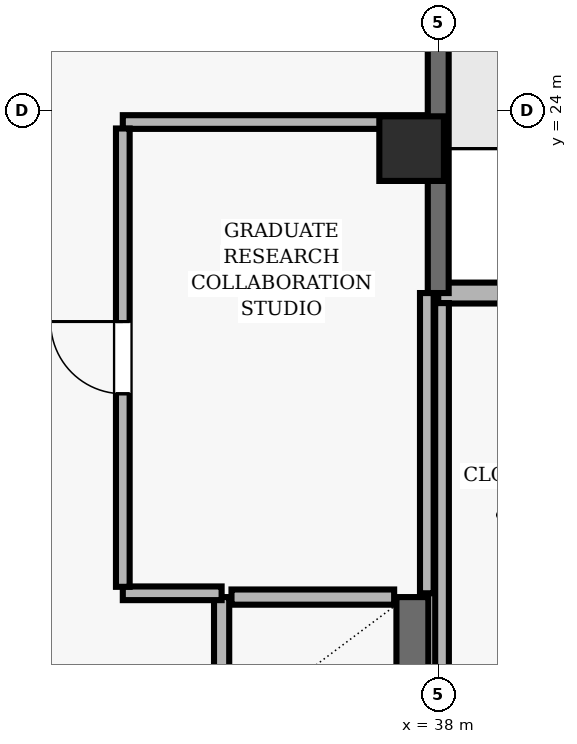
"""IFC4 building model, lengths in metres.
Left out: names, types, materials, properties, quantities, classifications, styles, units other than length and angle.
Written with IfcOpenShell. Run it as: python <this file> out.ifc"""

import sys

from ifc_helpers import new_model, si_unit, direction, frame, frame_2d, origin, origin_2d, place, context, subcontext, project, spatial, rectangle, extrude, element, fill, save


model = new_model("IFC4")
c1 = context("Model", 3, precision=1e-05, world=origin(), true_north=direction((0.0, 1.0)))
c2 = subcontext(c1, "Body", "Model", "MODEL_VIEW")
j1 = project(units=[si_unit("LENGTHUNIT", "METRE"), si_unit("PLANEANGLEUNIT", "RADIAN")], contexts=[c1])
p1 = place(None, origin())
s1 = spatial("IfcSite", under=j1, at=p1, CompositionType="ELEMENT")
p2 = place(p1, origin())
s2 = spatial("IfcBuilding", under=s1, at=p2, CompositionType="ELEMENT")
p3 = place(p2, frame((0.0, 0.0, 279.4)))
s3 = spatial("IfcBuildingStorey", under=s2, at=p3, CompositionType="ELEMENT", Elevation=279.4)
p4 = place(p3, frame((37.65, 23.5, 0.0), z_axis=(0.0, 0.0, 1.0), x_axis=(1.0, 0.0, 0.0)))
e1 = element("IfcColumn", 1, at=p4, inside=s3, PredefinedType="COLUMN", context=c2, shape_type="SweptSolid", body=[
    extrude(rectangle(XDim=0.85, YDim=0.85, at=origin_2d()), origin(), (0.0, 0.0, 1.0), 3.9),
])
p5 = place(p3, frame((43.0, 21.6, 0.0), z_axis=(0.0, 0.0, 1.0), x_axis=(-1.0, 0.0, 0.0)))
e2 = element("IfcWall", 2, at=p5, inside=s3, PredefinedType="SOLIDWALL", context=c2, shape_type="SweptSolid", body=[
    extrude(rectangle(XDim=5.0, YDim=0.275, at=frame_2d((2.5, 0.0))), origin(), (0.0, 0.0, 1.0), 3.69),
])
p6 = place(p3, frame((38.0, 21.6, 0.0), z_axis=(0.0, 0.0, 1.0), x_axis=(0.0, 1.0, 0.0)))
e3 = element("IfcWall", 3, at=p6, inside=s3, PredefinedType="SOLIDWALL", context=c2, shape_type="SweptSolid", body=[
    extrude(rectangle(XDim=13.7, YDim=0.275, at=frame_2d((6.85, 0.0))), origin(), (0.0, 0.0, 1.0), 3.69),
])
p7 = place(p6, frame((5.85, 0.0, 0.0)))
e4 = element("IfcOpeningElement", 4, at=p7, cuts=e3, PredefinedType="OPENING", context=c2, shape_type="SweptSolid", body=[
    extrude(rectangle(XDim=1.0, YDim=2.2, at=frame_2d((0.5, 1.1))), frame((0.0, 0.147, 0.0), z_axis=(0.0, -1.0, 0.0), x_axis=(1.0, 0.0, 0.0)), (0.0, 0.0, 1.0), 0.295),
])
p8 = place(p6, frame((9.075, 0.0, 0.9)))
e5 = element("IfcOpeningElement", 5, at=p8, cuts=e3, PredefinedType="OPENING", context=c2, shape_type="SweptSolid", body=[
    extrude(rectangle(XDim=2.4, YDim=1.6, at=frame_2d((1.2, 0.8))), frame((0.0, 0.147, 0.0), z_axis=(0.0, -1.0, 0.0), x_axis=(1.0, 0.0, 0.0)), (0.0, 0.0, 1.0), 0.295),
])
p9 = place(p3, frame((35.15, 17.6, 0.0), z_axis=(0.0, 0.0, 1.0), x_axis=(0.0, -1.0, 0.0)))
e6 = element("IfcWall", 6, at=p9, inside=s3, PredefinedType="SOLIDWALL", context=c2, shape_type="SweptSolid", body=[
    extrude(rectangle(XDim=1.85, YDim=0.2, at=frame_2d((0.925, 0.0))), origin(), (0.0, 0.0, 1.0), 3.69),
])
p10 = place(p3, frame((37.66, 15.75, 0.0), z_axis=(0.0, 0.0, 1.0), x_axis=(0.0, 1.0, 0.0)))
e7 = element("IfcWall", 7, at=p10, inside=s3, PredefinedType="SHEAR", context=c2, shape_type="SweptSolid", body=[
    extrude(rectangle(XDim=1.85, YDim=0.42, at=frame_2d((0.925, 0.0))), origin(), (0.0, 0.0, 1.0), 3.69),
])
p11 = place(p3, frame((37.42, 17.6, 0.0), z_axis=(0.0, 0.0, 1.0), x_axis=(-1.0, 0.0, 0.0)))
e8 = element("IfcWall", 8, at=p11, inside=s3, PredefinedType="SOLIDWALL", context=c2, shape_type="SweptSolid", body=[
    extrude(rectangle(XDim=2.14, YDim=0.2, at=frame_2d((1.07, 0.0))), origin(), (0.0, 0.0, 1.0), 3.69),
])
p12 = place(p3, frame((33.85, 17.65, 0.0), z_axis=(0.0, 0.0, 1.0), x_axis=(1.0, 0.0, 0.0)))
e9 = element("IfcWall", 9, at=p12, inside=s3, PredefinedType="PARTITIONING", context=c2, shape_type="SweptSolid", body=[
    extrude(rectangle(XDim=1.3, YDim=0.18, at=frame_2d((0.65, 0.0))), origin(), (0.0, 0.0, 1.0), 3.69),
])
p13 = place(p3, frame((37.85, 23.85, 0.0), z_axis=(0.0, 0.0, 1.0), x_axis=(-1.0, 0.0, 0.0)))
e10 = element("IfcWall", 10, at=p13, inside=s3, PredefinedType="PARTITIONING", context=c2, shape_type="SweptSolid", body=[
    extrude(rectangle(XDim=4.0, YDim=0.18, at=frame_2d((2.0, 0.0))), origin(), (0.0, 0.0, 1.0), 3.221),
])
p14 = place(p3, frame((33.85, 17.735, 0.0), z_axis=(0.0, 0.0, 1.0), x_axis=(0.0, 1.0, 0.0)))
e11 = element("IfcWall", 11, at=p14, inside=s3, PredefinedType="PARTITIONING", context=c2, shape_type="SweptSolid", body=[
    extrude(rectangle(XDim=6.03, YDim=0.18, at=frame_2d((3.015, 0.0))), origin(), (0.0, 0.0, 1.0), 3.69),
])
p15 = place(p14, frame((2.54, 0.0, 0.0)))
e12 = element("IfcOpeningElement", 12, at=p15, cuts=e11, PredefinedType="OPENING", context=c2, shape_type="SweptSolid", body=[
    extrude(rectangle(XDim=0.95, YDim=2.1, at=frame_2d((0.475, 1.05))), frame((0.0, 0.1, 0.0), z_axis=(0.0, -1.0, 0.0), x_axis=(1.0, 0.0, 0.0)), (0.0, 0.0, 1.0), 0.2),
])
p16 = place(p3, frame((37.85, 17.65, 0.0), z_axis=(0.0, 0.0, 1.0), x_axis=(0.0, 1.0, 0.0)))
e13 = element("IfcWall", 13, at=p16, inside=s3, PredefinedType="PARTITIONING", context=c2, shape_type="SweptSolid", body=[
    extrude(rectangle(XDim=3.95, YDim=0.18, at=frame_2d((1.975, 0.0))), origin(), (0.0, 0.0, 1.0), 3.221),
])
p17 = place(p3, frame((38.05, 21.468, 0.0), z_axis=(0.0, 0.0, 1.0), x_axis=(0.0, -1.0, 0.0)))
e14 = element("IfcWall", 14, at=p17, inside=s3, PredefinedType="PARTITIONING", context=c2, shape_type="SweptSolid", body=[
    extrude(rectangle(XDim=5.393, YDim=0.18, at=frame_2d((2.697, 0.0))), origin(), (0.0, 0.0, 1.0), 3.221),
])
p18 = place(p15, origin())
e15 = element("IfcDoor", 15, at=p18, inside=s3, OperationType="SINGLE_SWING_RIGHT", PredefinedType="DOOR", context=c2, shape_type="SweptSolid", body=[
    extrude(rectangle(XDim=0.95, YDim=2.1, at=frame_2d((0.475, 1.05))), frame((0.0, 0.025, 0.0), z_axis=(0.0, -1.0, 0.0), x_axis=(1.0, 0.0, 0.0)), (0.0, 0.0, 1.0), 0.05),
])
fill(e12, e15)
save(model, sys.argv[1])
